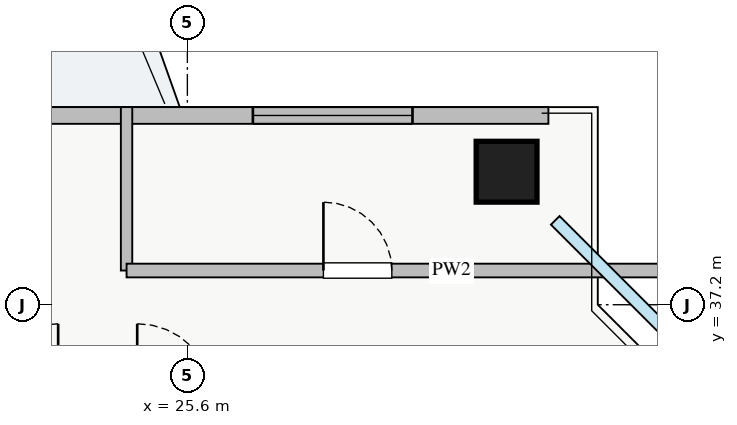
"""IFC4 building model, lengths in metres.
Left out: names, types, materials, properties, quantities, classifications, styles, units other than length and angle.
Written with IfcOpenShell. Run it as: python <this file> out.ifc"""

import sys

from ifc_helpers import new_model, si_unit, direction, frame, frame_2d, origin, origin_2d, place, context, subcontext, project, spatial, rectangle, extrude, source, transform, mapped, element, fill, save


model = new_model("IFC4")
c1 = context("Model", 3, precision=1e-05, world=origin(), true_north=direction((0.0, 1.0)))
c2 = subcontext(c1, "Body", "Model", "MODEL_VIEW")
j1 = project(units=[si_unit("LENGTHUNIT", "METRE"), si_unit("PLANEANGLEUNIT", "RADIAN")], contexts=[c1])
p1 = place(None, origin())
s1 = spatial("IfcSite", under=j1, at=p1, CompositionType="ELEMENT")
p2 = place(p1, origin())
s2 = spatial("IfcBuilding", under=s1, at=p2, CompositionType="ELEMENT")
p3 = place(p2, frame((0.0, 0.0, 219.75)))
s3 = spatial("IfcBuildingStorey", under=s2, at=p3, CompositionType="ELEMENT", Elevation=219.75)
m1 = source(origin(), c2, "Body", "SweptSolid", [
    extrude(rectangle(XDim=0.8, YDim=0.8, at=origin_2d()), origin(), (0.0, 0.0, 1.0), 3.25),
])
p4 = place(p3, frame((29.8, 38.95, 0.0), z_axis=(0.0, 0.0, 1.0), x_axis=(1.0, 0.0, 0.0)))
e1 = element("IfcColumn", 1, at=p4, inside=s3, PredefinedType="COLUMN", context=c2, shape_type="MappedRepresentation", body=[
    mapped(m1, transform((0.0, 0.0, 0.0), x_axis=(1.0, 0.0, 0.0), y_axis=(0.0, 1.0, 0.0), z_axis=(0.0, 0.0, 1.0), scale=1.0)),
])
p5 = place(p3, frame((7.65, 39.69, 0.0), z_axis=(0.0, 0.0, 1.0), x_axis=(1.0, 0.0, 0.0)))
e2 = element("IfcWall", 2, at=p5, inside=s3, PredefinedType="STANDARD", context=c2, shape_type="SweptSolid", body=[
    extrude(rectangle(XDim=22.7, YDim=0.22, at=frame_2d((11.35, 0.0))), origin(), (0.0, 0.0, 1.0), 2.61),
])
p6 = place(p5, frame((12.2, 0.0, 0.0)))
e3 = element("IfcOpeningElement", 3, at=p6, cuts=e2, PredefinedType="OPENING", context=c2, shape_type="SweptSolid", body=[
    extrude(rectangle(XDim=1.2, YDim=2.1, at=frame_2d((0.6, 1.05))), frame((0.0, 0.12, 0.0), z_axis=(0.0, -1.0, 0.0), x_axis=(1.0, 0.0, 0.0)), (0.0, 0.0, 1.0), 0.24),
])
p7 = place(p5, frame((1.637, 0.0, 0.9)))
e4 = element("IfcOpeningElement", 4, at=p7, cuts=e2, PredefinedType="OPENING", context=c2, shape_type="SweptSolid", body=[
    extrude(rectangle(XDim=2.4, YDim=1.48, at=frame_2d((1.2, 0.74))), frame((0.0, 0.12, 0.0), z_axis=(0.0, -1.0, 0.0), x_axis=(1.0, 0.0, 0.0)), (0.0, 0.0, 1.0), 0.24),
])
p8 = place(p5, frame((7.612, 0.0, 0.9)))
e5 = element("IfcOpeningElement", 5, at=p8, cuts=e2, PredefinedType="OPENING", context=c2, shape_type="SweptSolid", body=[
    extrude(rectangle(XDim=1.8, YDim=1.45, at=frame_2d((0.9, 0.725))), frame((0.0, 0.12, 0.0), z_axis=(0.0, -1.0, 0.0), x_axis=(1.0, 0.0, 0.0)), (0.0, 0.0, 1.0), 0.24),
])
p9 = place(p5, frame((18.812, 0.0, 0.9)))
e6 = element("IfcOpeningElement", 6, at=p9, cuts=e2, PredefinedType="OPENING", context=c2, shape_type="SweptSolid", body=[
    extrude(rectangle(XDim=2.1, YDim=1.48, at=frame_2d((1.05, 0.74))), frame((0.0, 0.12, 0.0), z_axis=(0.0, -1.0, 0.0), x_axis=(1.0, 0.0, 0.0)), (0.0, 0.0, 1.0), 0.24),
])
p10 = place(p3, frame((24.8, 37.65, 0.0), z_axis=(0.0, 0.0, 1.0), x_axis=(0.0, 1.0, 0.0)))
e7 = element("IfcWall", 7, at=p10, inside=s3, PredefinedType="PARTITIONING", context=c2, shape_type="SweptSolid", body=[
    extrude(rectangle(XDim=2.15, YDim=0.15, at=frame_2d((1.075, 0.0))), origin(), (0.0, 0.0, 1.0), 3.07),
])
p11 = place(p3, frame((24.8, 37.65, 0.0), z_axis=(0.0, 0.0, 1.0), x_axis=(1.0, 0.0, 0.0)))
e8 = element("IfcWall", 8, at=p11, inside=s3, PredefinedType="PARTITIONING", context=c2, shape_type="SweptSolid", body=[
    extrude(rectangle(XDim=7.65, YDim=0.18, at=frame_2d((3.825, 0.0))), origin(), (0.0, 0.0, 1.0), 3.07),
])
p12 = place(p11, frame((2.59, 0.0, 0.0)))
e9 = element("IfcOpeningElement", 9, at=p12, cuts=e8, PredefinedType="OPENING", context=c2, shape_type="SweptSolid", body=[
    extrude(rectangle(XDim=0.9, YDim=2.05, at=frame_2d((0.45, 1.025))), frame((0.0, 0.1, 0.0), z_axis=(0.0, -1.0, 0.0), x_axis=(1.0, 0.0, 0.0)), (0.0, 0.0, 1.0), 0.2),
])
m2 = source(origin(), c2, "Body", "SweptSolid", [
    extrude(rectangle(XDim=2.1, YDim=1.48, at=frame_2d((1.05, 0.74))), frame((0.0, 0.03, 0.0), z_axis=(0.0, -1.0, 0.0), x_axis=(1.0, 0.0, 0.0)), (0.0, 0.0, 1.0), 0.06),
])
p13 = place(p9, origin())
e10 = element("IfcWindow", 10, at=p13, inside=s3, PartitioningType="TRIPLE_PANEL_VERTICAL", PredefinedType="WINDOW", context=c2, shape_type="MappedRepresentation", body=[
    mapped(m2, transform((0.0, 0.0, 0.0), x_axis=(1.0, 0.0, 0.0), y_axis=(0.0, 1.0, 0.0), z_axis=(0.0, 0.0, 1.0), scale=1.0)),
])
fill(e6, e10)
m3 = source(origin(), c2, "Body", "SweptSolid", [
    extrude(rectangle(XDim=0.9, YDim=2.05, at=frame_2d((0.45, 1.025))), frame((0.0, 0.025, 0.0), z_axis=(0.0, -1.0, 0.0), x_axis=(1.0, 0.0, 0.0)), (0.0, 0.0, 1.0), 0.05),
])
p14 = place(p12, origin())
e11 = element("IfcDoor", 11, at=p14, inside=s3, OperationType="SINGLE_SWING_LEFT", PredefinedType="DOOR", context=c2, shape_type="MappedRepresentation", body=[
    mapped(m3, transform((0.0, 0.0, 0.0), x_axis=(1.0, 0.0, 0.0), y_axis=(0.0, 1.0, 0.0), z_axis=(0.0, 0.0, 1.0), scale=1.0)),
])
fill(e9, e11)
save(model, sys.argv[1])
